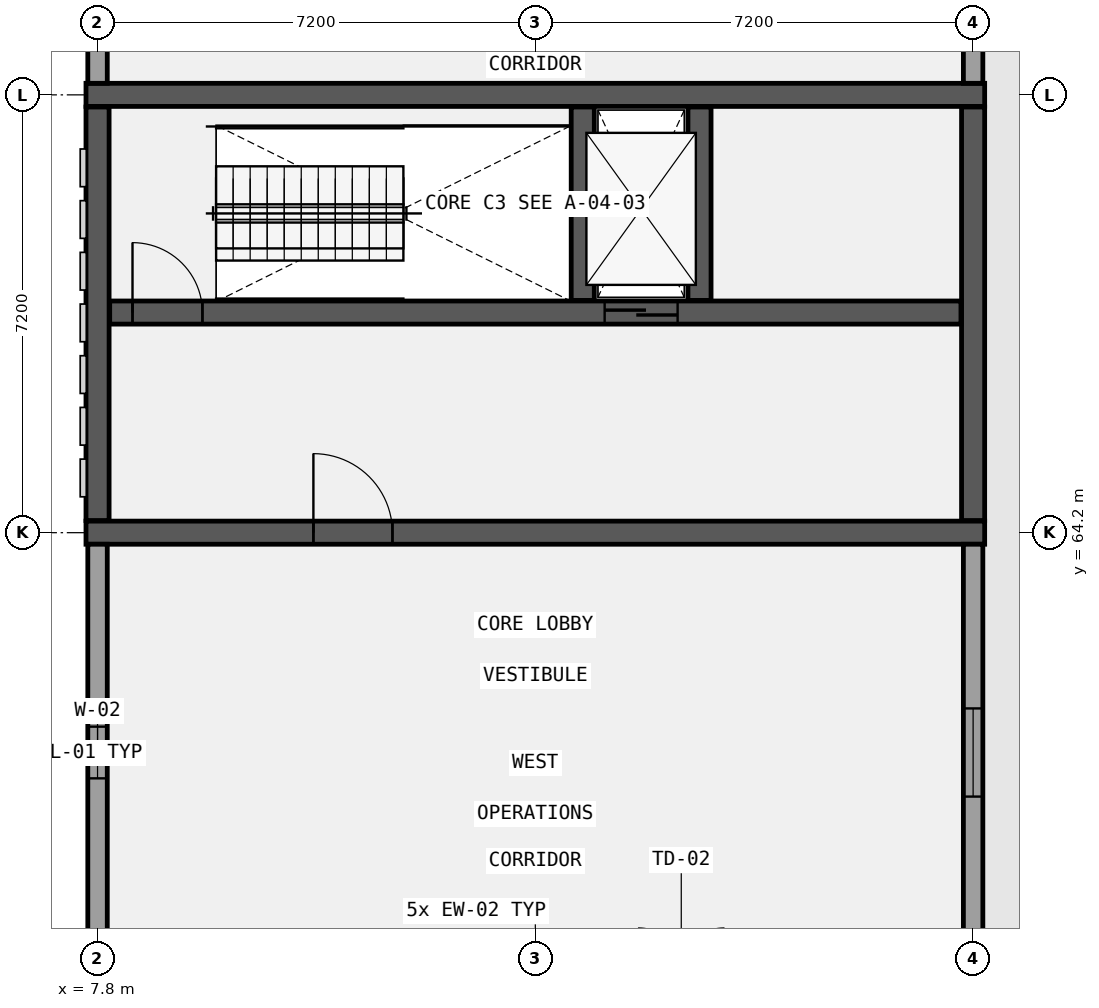
"""IFC4 building model, lengths in metres.
Left out: names, types, materials, properties, quantities, classifications, styles, units other than length and angle.
Written with IfcOpenShell. Run it as: python <this file> out.ifc"""

import sys

from ifc_helpers import new_model, si_unit, direction, frame, frame_2d, origin, place, context, subcontext, project, spatial, rectangle, extrude, element, fill, save


model = new_model("IFC4")
c1 = context("Model", 3, precision=1e-05, world=origin(), true_north=direction((0.0, 1.0)))
c2 = subcontext(c1, "Body", "Model", "MODEL_VIEW")
j1 = project(units=[si_unit("LENGTHUNIT", "METRE"), si_unit("PLANEANGLEUNIT", "RADIAN")], contexts=[c1])
p1 = place(None, origin())
s1 = spatial("IfcSite", under=j1, at=p1, CompositionType="ELEMENT")
p2 = place(p1, origin())
s2 = spatial("IfcBuilding", under=s1, at=p2, CompositionType="ELEMENT")
p3 = place(p2, frame((0.0, 0.0, 18.0)))
s3 = spatial("IfcBuildingStorey", under=s2, at=p3, CompositionType="ELEMENT", Elevation=18.0)
p4 = place(p3, frame((7.61, 71.4, 0.0), z_axis=(0.0, 0.0, 1.0), x_axis=(1.0, 0.0, 0.0)))
e1 = element("IfcWall", 1, at=p4, inside=s3, PredefinedType="SHEAR", context=c2, shape_type="SweptSolid", body=[
    extrude(rectangle(XDim=14.78, YDim=0.38, at=frame_2d((7.39, 0.0))), origin(), (0.0, 0.0, 1.0), 4.2),
])
p5 = place(p3, frame((7.61, 64.2, 0.0), z_axis=(0.0, 0.0, 1.0), x_axis=(1.0, 0.0, 0.0)))
e2 = element("IfcWall", 2, at=p5, inside=s3, PredefinedType="SHEAR", context=c2, shape_type="SweptSolid", body=[
    extrude(rectangle(XDim=14.78, YDim=0.38, at=frame_2d((7.39, 0.0))), origin(), (0.0, 0.0, 1.0), 4.2),
])
p6 = place(p5, frame((3.74, 0.0, 0.0)))
e3 = element("IfcOpeningElement", 3, at=p6, cuts=e2, PredefinedType="OPENING", context=c2, shape_type="SweptSolid", body=[
    extrude(rectangle(XDim=1.3, YDim=2.2, at=frame_2d((0.65, 1.1))), frame((0.0, 0.2, 0.0), z_axis=(0.0, -1.0, 0.0), x_axis=(1.0, 0.0, 0.0)), (0.0, 0.0, 1.0), 0.4),
])
for number, where, z_axis, x_axis in (
    (4, (7.8, 64.4, 0.0), (0.0, 0.0, 1.0), (0.0, 1.0, 0.0)),
    (5, (22.2, 64.4, 0.0), (0.0, 0.0, 1.0), (0.0, 1.0, 0.0)),
):
    element("IfcWall", number, at=place(p3, frame(where, z_axis=z_axis, x_axis=x_axis)), inside=s3, PredefinedType="SHEAR", context=c2, shape_type="SweptSolid", body=[
        extrude(rectangle(XDim=6.8, YDim=0.38, at=frame_2d((3.4, 0.0))), origin(), (0.0, 0.0, 1.0), 4.2),
    ])
p7 = place(p3, frame((8.0, 67.82, 0.0), z_axis=(0.0, 0.0, 1.0), x_axis=(1.0, 0.0, 0.0)))
e6 = element("IfcWall", 6, at=p7, inside=s3, PredefinedType="SHEAR", context=c2, shape_type="SweptSolid", body=[
    extrude(rectangle(XDim=14.0, YDim=0.38, at=frame_2d((7.0, 0.0))), origin(), (0.0, 0.0, 1.0), 4.2),
])
p8 = place(p7, frame((8.14, 0.0, 0.0)))
e7 = element("IfcOpeningElement", 7, at=p8, cuts=e6, PredefinedType="OPENING", context=c2, shape_type="SweptSolid", body=[
    extrude(rectangle(XDim=1.2, YDim=2.15, at=frame_2d((0.6, 1.075))), frame((0.0, 0.2, 0.0), z_axis=(0.0, -1.0, 0.0), x_axis=(1.0, 0.0, 0.0)), (0.0, 0.0, 1.0), 0.4),
])
p9 = place(p7, frame((0.375, 0.0, 0.0)))
e8 = element("IfcOpeningElement", 8, at=p9, cuts=e6, PredefinedType="OPENING", context=c2, shape_type="SweptSolid", body=[
    extrude(rectangle(XDim=1.15, YDim=2.15, at=frame_2d((0.575, 1.075))), frame((0.0, 0.2, 0.0), z_axis=(0.0, -1.0, 0.0), x_axis=(1.0, 0.0, 0.0)), (0.0, 0.0, 1.0), 0.4),
])
for number, where, z_axis, x_axis in (
    (9, (15.78, 68.02, 0.0), (0.0, 0.0, 1.0), (0.0, 1.0, 0.0)),
    (10, (17.7, 68.02, 0.0), (0.0, 0.0, 1.0), (0.0, 1.0, 0.0)),
):
    element("IfcWall", number, at=place(p3, frame(where, z_axis=z_axis, x_axis=x_axis)), inside=s3, PredefinedType="SHEAR", context=c2, shape_type="SweptSolid", body=[
        extrude(rectangle(XDim=3.18, YDim=0.38, at=frame_2d((1.59, 0.0))), origin(), (0.0, 0.0, 1.0), 4.2),
    ])
p10 = place(p3, frame((7.8, 78.44, 0.0), z_axis=(0.0, 0.0, 1.0), x_axis=(0.0, -1.0, 0.0)))
e11 = element("IfcWall", 11, at=p10, inside=s3, PredefinedType="SOLIDWALL", context=c2, shape_type="SweptSolid", body=[
    extrude(rectangle(XDim=6.85, YDim=0.32, at=frame_2d((3.425, 0.0))), origin(), (0.0, 0.0, 1.0), 3.29),
])
p11 = place(p10, frame((2.775, 0.0, 1.0)))
e12 = element("IfcOpeningElement", 12, at=p11, cuts=e11, PredefinedType="OPENING", context=c2, shape_type="SweptSolid", body=[
    extrude(rectangle(XDim=1.3, YDim=1.65, at=frame_2d((0.65, 0.825))), frame((0.0, 0.17, 0.0), z_axis=(0.0, -1.0, 0.0), x_axis=(1.0, 0.0, 0.0)), (0.0, 0.0, 1.0), 0.34),
])
p12 = place(p3, frame((7.8, 64.01, 0.0), z_axis=(0.0, 0.0, 1.0), x_axis=(0.0, -1.0, 0.0)))
e13 = element("IfcWall", 13, at=p12, inside=s3, PredefinedType="SOLIDWALL", context=c2, shape_type="SweptSolid", body=[
    extrude(rectangle(XDim=6.85, YDim=0.32, at=frame_2d((3.425, 0.0))), origin(), (0.0, 0.0, 1.0), 3.39),
])
p13 = place(p12, frame((3.0, 0.0, 1.0)))
e14 = element("IfcOpeningElement", 14, at=p13, cuts=e13, PredefinedType="OPENING", context=c2, shape_type="SweptSolid", body=[
    extrude(rectangle(XDim=0.85, YDim=1.65, at=frame_2d((0.425, 0.825))), frame((0.0, 0.17, 0.0), z_axis=(0.0, -1.0, 0.0), x_axis=(1.0, 0.0, 0.0)), (0.0, 0.0, 1.0), 0.34),
])
p14 = place(p3, frame((22.2, 57.16, 0.0), z_axis=(0.0, 0.0, 1.0), x_axis=(0.0, 1.0, 0.0)))
e15 = element("IfcWall", 15, at=p14, inside=s3, PredefinedType="SOLIDWALL", context=c2, shape_type="SweptSolid", body=[
    extrude(rectangle(XDim=6.85, YDim=0.32, at=frame_2d((3.425, 0.0))), origin(), (0.0, 0.0, 1.0), 3.29),
])
p15 = place(p14, frame((2.7, 0.0, 1.0)))
e16 = element("IfcOpeningElement", 16, at=p15, cuts=e15, PredefinedType="OPENING", context=c2, shape_type="SweptSolid", body=[
    extrude(rectangle(XDim=1.45, YDim=1.4, at=frame_2d((0.725, 0.7))), frame((0.0, 0.17, 0.0), z_axis=(0.0, -1.0, 0.0), x_axis=(1.0, 0.0, 0.0)), (0.0, 0.0, 1.0), 0.34),
])
p16 = place(p3, frame((22.2, 71.59, 0.0), z_axis=(0.0, 0.0, 1.0), x_axis=(0.0, 1.0, 0.0)))
e17 = element("IfcWall", 17, at=p16, inside=s3, PredefinedType="SOLIDWALL", context=c2, shape_type="SweptSolid", body=[
    extrude(rectangle(XDim=6.85, YDim=0.32, at=frame_2d((3.425, 0.0))), origin(), (0.0, 0.0, 1.0), 3.24),
])
p17 = place(p16, frame((2.7, 0.0, 1.0)))
e18 = element("IfcOpeningElement", 18, at=p17, cuts=e17, PredefinedType="OPENING", context=c2, shape_type="SweptSolid", body=[
    extrude(rectangle(XDim=1.45, YDim=1.4, at=frame_2d((0.725, 0.7))), frame((0.0, 0.17, 0.0), z_axis=(0.0, -1.0, 0.0), x_axis=(1.0, 0.0, 0.0)), (0.0, 0.0, 1.0), 0.34),
])
p18 = place(p8, frame((1.2, 0.0, 0.0), z_axis=(0.0, 0.0, 1.0), x_axis=(-1.0, 0.0, 0.0)))
e19 = element("IfcDoor", 19, at=p18, inside=s3, OperationType="DOUBLE_DOOR_SLIDING", PredefinedType="DOOR", context=c2, shape_type="SweptSolid", body=[
    extrude(rectangle(XDim=1.2, YDim=2.15, at=frame_2d((0.6, 1.075))), frame((0.0, 0.025, 0.0), z_axis=(0.0, -1.0, 0.0), x_axis=(1.0, 0.0, 0.0)), (0.0, 0.0, 1.0), 0.05),
])
fill(e7, e19)
p19 = place(p9, origin())
e20 = element("IfcDoor", 20, at=p19, inside=s3, OperationType="SINGLE_SWING_LEFT", PredefinedType="DOOR", context=c2, shape_type="SweptSolid", body=[
    extrude(rectangle(XDim=1.15, YDim=2.15, at=frame_2d((0.575, 1.075))), frame((0.0, 0.025, 0.0), z_axis=(0.0, -1.0, 0.0), x_axis=(1.0, 0.0, 0.0)), (0.0, 0.0, 1.0), 0.05),
])
fill(e8, e20)
p20 = place(p6, frame((1.3, 0.0, 0.0), z_axis=(0.0, 0.0, 1.0), x_axis=(-1.0, 0.0, 0.0)))
e21 = element("IfcDoor", 21, at=p20, inside=s3, OperationType="SINGLE_SWING_LEFT", PredefinedType="DOOR", context=c2, shape_type="SweptSolid", body=[
    extrude(rectangle(XDim=1.3, YDim=2.2, at=frame_2d((0.65, 1.1))), frame((0.0, 0.025, 0.0), z_axis=(0.0, -1.0, 0.0), x_axis=(1.0, 0.0, 0.0)), (0.0, 0.0, 1.0), 0.05),
])
fill(e3, e21)
p21 = place(p13, origin())
e22 = element("IfcWindow", 22, at=p21, inside=s3, PartitioningType="SINGLE_PANEL", PredefinedType="WINDOW", context=c2, shape_type="SweptSolid", body=[
    extrude(rectangle(XDim=0.85, YDim=1.65, at=frame_2d((0.425, 0.825))), frame((0.0, 0.03, 0.0), z_axis=(0.0, -1.0, 0.0), x_axis=(1.0, 0.0, 0.0)), (0.0, 0.0, 1.0), 0.06),
])
fill(e14, e22)
p22 = place(p15, origin())
e23 = element("IfcWindow", 23, at=p22, inside=s3, PartitioningType="SINGLE_PANEL", PredefinedType="WINDOW", context=c2, shape_type="SweptSolid", body=[
    extrude(rectangle(XDim=1.45, YDim=1.4, at=frame_2d((0.725, 0.7))), frame((0.0, 0.03, 0.0), z_axis=(0.0, -1.0, 0.0), x_axis=(1.0, 0.0, 0.0)), (0.0, 0.0, 1.0), 0.06),
])
fill(e16, e23)
save(model, sys.argv[1])
